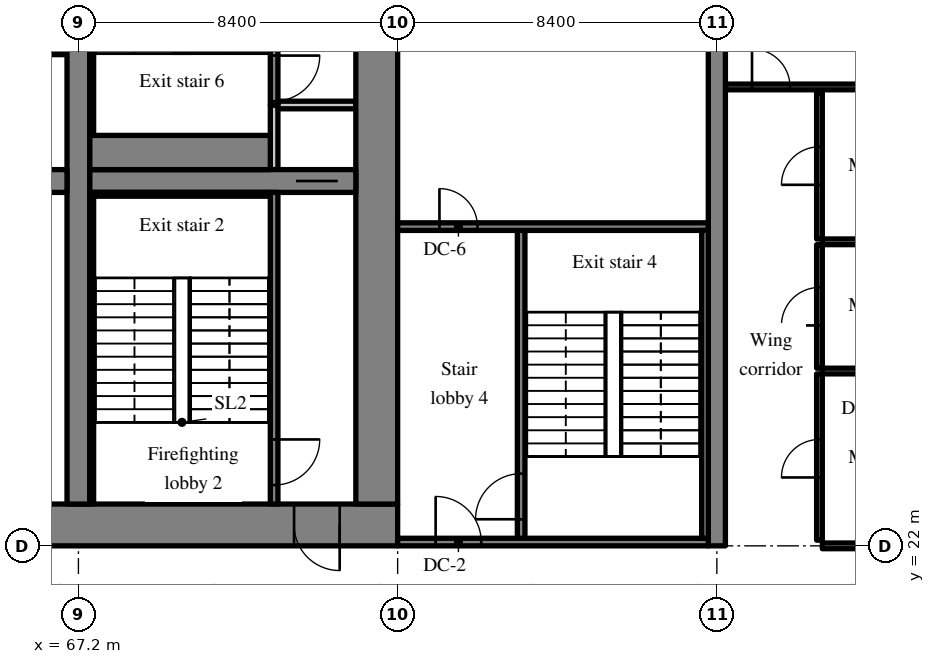
"""IFC4 building model, lengths in metres.
Left out: names, types, materials, properties, quantities, classifications, styles, units other than length and angle.
Written with IfcOpenShell. Run it as: python <this file> out.ifc"""

import sys

from ifc_helpers import new_model, si_unit, direction, frame, frame_2d, origin, place, context, subcontext, project, spatial, rectangle, extrude, source, transform, mapped, element, fill, save


model = new_model("IFC4")
c1 = context("Model", 3, precision=1e-05, world=origin(), true_north=direction((0.0, 1.0)))
c2 = subcontext(c1, "Body", "Model", "MODEL_VIEW")
j1 = project(units=[si_unit("LENGTHUNIT", "METRE"), si_unit("PLANEANGLEUNIT", "RADIAN")], contexts=[c1])
p1 = place(None, origin())
s1 = spatial("IfcSite", under=j1, at=p1, CompositionType="ELEMENT")
p2 = place(p1, origin())
s2 = spatial("IfcBuilding", under=s1, at=p2, CompositionType="ELEMENT")
p3 = place(p2, frame((0.0, 0.0, 35.4)))
s3 = spatial("IfcBuildingStorey", under=s2, at=p3, CompositionType="ELEMENT", Elevation=35.4)
m1 = source(origin(), c2, "Body", "SweptSolid", [
    extrude(rectangle(XDim=50.4, YDim=1.1, at=frame_2d((25.2, 0.0))), origin(), (0.0, 0.0, 1.0), 3.52),
])
p4 = place(p3, frame((25.2, 22.55, 0.0), z_axis=(0.0, 0.0, 1.0), x_axis=(1.0, 0.0, 0.0)))
e1 = element("IfcWall", 1, at=p4, inside=s3, PredefinedType="SHEAR", context=c2, shape_type="MappedRepresentation", body=[
    mapped(m1, transform((0.0, 0.0, 0.0), scale=1.0)),
])
m2 = source(origin(), c2, "Body", "SweptSolid", [
    extrude(rectangle(XDim=1.8, YDim=2.1, at=frame_2d((0.9, 1.05))), frame((0.0, 0.56, 0.0), z_axis=(0.0, -1.0, 0.0), x_axis=(1.0, 0.0, 0.0)), (0.0, 0.0, 1.0), 1.12),
])
p5 = place(p4, frame((15.9, 0.0, 0.0)))
e2 = element("IfcOpeningElement", 2, at=p5, cuts=e1, PredefinedType="OPENING", context=c2, shape_type="MappedRepresentation", body=[
    mapped(m2, transform((0.0, 0.0, 0.0), scale=1.0)),
])
m3 = source(origin(), c2, "Body", "SweptSolid", [
    extrude(rectangle(XDim=1.2, YDim=2.1, at=frame_2d((0.6, 1.05))), frame((0.0, 0.56, 0.0), z_axis=(0.0, -1.0, 0.0), x_axis=(1.0, 0.0, 0.0)), (0.0, 0.0, 1.0), 1.12),
])
p6 = place(p4, frame((27.0, 0.0, 0.0)))
e3 = element("IfcOpeningElement", 3, at=p6, cuts=e1, PredefinedType="OPENING", context=c2, shape_type="MappedRepresentation", body=[
    mapped(m3, transform((0.0, 0.0, 0.0), scale=1.0)),
])
m4 = source(origin(), c2, "Body", "SweptSolid", [
    extrude(rectangle(XDim=0.9, YDim=2.1, at=frame_2d((0.45, 1.05))), frame((0.0, 0.56, 0.0), z_axis=(0.0, -1.0, 0.0), x_axis=(1.0, 0.0, 0.0)), (0.0, 0.0, 1.0), 1.12),
])
p7 = place(p4, frame((33.75, 0.0, 0.0)))
e4 = element("IfcOpeningElement", 4, at=p7, cuts=e1, PredefinedType="OPENING", context=c2, shape_type="MappedRepresentation", body=[
    mapped(m4, transform((0.0, 0.0, 0.0), scale=1.0)),
])
p8 = place(p4, frame((30.75, 0.0, 0.0)))
e5 = element("IfcOpeningElement", 5, at=p8, cuts=e1, PredefinedType="OPENING", context=c2, shape_type="MappedRepresentation", body=[
    mapped(m4, transform((0.0, 0.0, 0.0), scale=1.0)),
])
p9 = place(p4, frame((39.75, 0.0, 0.0)))
e6 = element("IfcOpeningElement", 6, at=p9, cuts=e1, PredefinedType="OPENING", context=c2, shape_type="MappedRepresentation", body=[
    mapped(m4, transform((0.0, 0.0, 0.0), scale=1.0)),
])
p10 = place(p4, frame((36.75, 0.0, 0.0)))
e7 = element("IfcOpeningElement", 7, at=p10, cuts=e1, PredefinedType="OPENING", context=c2, shape_type="MappedRepresentation", body=[
    mapped(m4, transform((0.0, 0.0, 0.0), scale=1.0)),
])
p11 = place(p4, frame((6.425, 0.0, 0.0)))
e8 = element("IfcOpeningElement", 8, at=p11, cuts=e1, PredefinedType="OPENING", context=c2, shape_type="MappedRepresentation", body=[
    mapped(m3, transform((0.0, 0.0, 0.0), scale=1.0)),
])
p12 = place(p4, frame((47.675, 0.0, 0.0)))
e9 = element("IfcOpeningElement", 9, at=p12, cuts=e1, PredefinedType="OPENING", context=c2, shape_type="MappedRepresentation", body=[
    mapped(m3, transform((0.0, 0.0, 0.0), scale=1.0)),
])
m5 = source(origin(), c2, "Body", "SweptSolid", [
    extrude(rectangle(XDim=17.8, YDim=1.1, at=frame_2d((8.9, 0.0))), origin(), (0.0, 0.0, 1.0), 3.52),
])
p13 = place(p3, frame((75.05, 23.1, 0.0), z_axis=(0.0, 0.0, 1.0), x_axis=(0.0, 1.0, 0.0)))
e10 = element("IfcWall", 10, at=p13, inside=s3, PredefinedType="SHEAR", context=c2, shape_type="MappedRepresentation", body=[
    mapped(m5, transform((0.0, 0.0, 0.0), scale=1.0)),
])
p14 = place(p13, frame((12.3, 0.0, 0.0)))
e11 = element("IfcOpeningElement", 11, at=p14, cuts=e10, PredefinedType="OPENING", context=c2, shape_type="MappedRepresentation", body=[
    mapped(m3, transform((0.0, 0.0, 0.0), scale=1.0)),
])
m6 = source(origin(), c2, "Body", "SweptSolid", [
    extrude(rectangle(XDim=17.8, YDim=0.6, at=frame_2d((8.9, 0.0))), origin(), (0.0, 0.0, 1.0), 3.52),
])
p15 = place(p3, frame((67.2, 23.1, 0.0), z_axis=(0.0, 0.0, 1.0), x_axis=(0.0, 1.0, 0.0)))
e12 = element("IfcWall", 12, at=p15, inside=s3, PredefinedType="SHEAR", context=c2, shape_type="MappedRepresentation", body=[
    mapped(m6, transform((0.0, 0.0, 0.0), scale=1.0)),
])
m7 = source(origin(), c2, "Body", "SweptSolid", [
    extrude(rectangle(XDim=16.2, YDim=0.6, at=frame_2d((8.1, 0.0))), origin(), (0.0, 0.0, 1.0), 3.52),
])
p16 = place(p3, frame((50.7, 31.6, 0.0), z_axis=(0.0, 0.0, 1.0), x_axis=(1.0, 0.0, 0.0)))
e13 = element("IfcWall", 13, at=p16, inside=s3, PredefinedType="SHEAR", context=c2, shape_type="MappedRepresentation", body=[
    mapped(m7, transform((0.0, 0.0, 0.0), scale=1.0)),
])
m8 = source(origin(), c2, "Body", "SweptSolid", [
    extrude(rectangle(XDim=1.0, YDim=2.1, at=frame_2d((0.5, 1.05))), frame((0.0, 0.31, 0.0), z_axis=(0.0, -1.0, 0.0), x_axis=(1.0, 0.0, 0.0)), (0.0, 0.0, 1.0), 0.62),
])
p17 = place(p16, frame((0.55, 0.0, 0.0)))
e14 = element("IfcOpeningElement", 14, at=p17, cuts=e13, PredefinedType="OPENING", context=c2, shape_type="MappedRepresentation", body=[
    mapped(m8, transform((0.0, 0.0, 0.0), scale=1.0)),
])
m9 = source(origin(), c2, "Body", "SweptSolid", [
    extrude(rectangle(XDim=7.0, YDim=0.6, at=frame_2d((3.5, 0.0))), origin(), (0.0, 0.0, 1.0), 3.52),
])
p18 = place(p3, frame((67.5, 31.6, 0.0), z_axis=(0.0, 0.0, 1.0), x_axis=(1.0, 0.0, 0.0)))
e15 = element("IfcWall", 15, at=p18, inside=s3, PredefinedType="SHEAR", context=c2, shape_type="MappedRepresentation", body=[
    mapped(m9, transform((0.0, 0.0, 0.0), scale=1.0)),
])
m10 = source(origin(), c2, "Body", "SweptSolid", [
    extrude(rectangle(XDim=1.1, YDim=2.1, at=frame_2d((0.55, 1.05))), frame((0.0, 0.31, 0.0), z_axis=(0.0, -1.0, 0.0), x_axis=(1.0, 0.0, 0.0)), (0.0, 0.0, 1.0), 0.62),
])
p19 = place(p18, frame((5.425, 0.0, 0.0)))
e16 = element("IfcOpeningElement", 16, at=p19, cuts=e15, PredefinedType="OPENING", context=c2, shape_type="MappedRepresentation", body=[
    mapped(m10, transform((0.0, 0.0, 0.0), scale=1.0)),
])
m11 = source(origin(), c2, "Body", "SweptSolid", [
    extrude(rectangle(XDim=20.0, YDim=0.45, at=frame_2d((10.0, 0.0))), origin(), (0.0, 0.0, 1.0), 3.52),
])
p20 = place(p3, frame((84.0, 22.0, 0.0), z_axis=(0.0, 0.0, 1.0), x_axis=(0.0, 1.0, 0.0)))
e17 = element("IfcWall", 17, at=p20, inside=s3, PredefinedType="SHEAR", context=c2, shape_type="MappedRepresentation", body=[
    mapped(m11, transform((0.0, 0.0, 0.0), scale=1.0)),
])
m12 = source(origin(), c2, "Body", "SweptSolid", [
    extrude(rectangle(XDim=14.1, YDim=0.15, at=frame_2d((7.05, 0.0))), origin(), (0.0, 0.0, 1.0), 3.52),
])
p21 = place(p3, frame((66.9, 35.0, 0.0), z_axis=(0.0, 0.0, 1.0), x_axis=(-1.0, 0.0, 0.0)))
e18 = element("IfcWall", 18, at=p21, inside=s3, PredefinedType="PARTITIONING", context=c2, shape_type="MappedRepresentation", body=[
    mapped(m12, transform((0.0, 0.0, 0.0), scale=1.0)),
])
m13 = source(origin(), c2, "Body", "SweptSolid", [
    extrude(rectangle(XDim=0.9, YDim=2.1, at=frame_2d((0.45, 1.05))), frame((0.0, 0.085, 0.0), z_axis=(0.0, -1.0, 0.0), x_axis=(1.0, 0.0, 0.0)), (0.0, 0.0, 1.0), 0.17),
])
p22 = place(p21, frame((2.004, 0.0, 0.0)))
e19 = element("IfcOpeningElement", 19, at=p22, cuts=e18, PredefinedType="OPENING", context=c2, shape_type="MappedRepresentation", body=[
    mapped(m13, transform((0.0, 0.0, 0.0), scale=1.0)),
])
p23 = place(p21, frame((9.017, 0.0, 0.0)))
e20 = element("IfcOpeningElement", 20, at=p23, cuts=e18, PredefinedType="OPENING", context=c2, shape_type="MappedRepresentation", body=[
    mapped(m13, transform((0.0, 0.0, 0.0), scale=1.0)),
])
m14 = source(origin(), c2, "Body", "SweptSolid", [
    extrude(rectangle(XDim=8.2, YDim=0.2, at=frame_2d((4.1, 0.0))), origin(), (0.0, 0.0, 1.0), 3.52),
])
p24 = place(p3, frame((72.35, 23.1, 0.0), z_axis=(0.0, 0.0, 1.0), x_axis=(0.0, 1.0, 0.0)))
e21 = element("IfcWall", 21, at=p24, inside=s3, PredefinedType="SOLIDWALL", context=c2, shape_type="MappedRepresentation", body=[
    mapped(m14, transform((0.0, 0.0, 0.0), scale=1.0)),
])
m15 = source(origin(), c2, "Body", "SweptSolid", [
    extrude(rectangle(XDim=1.2, YDim=2.1, at=frame_2d((0.6, 1.05))), frame((0.0, 0.11, 0.0), z_axis=(0.0, -1.0, 0.0), x_axis=(1.0, 0.0, 0.0)), (0.0, 0.0, 1.0), 0.22),
])
p25 = place(p24, frame((0.5, 0.0, 0.0)))
e22 = element("IfcOpeningElement", 22, at=p25, cuts=e21, PredefinedType="OPENING", context=c2, shape_type="MappedRepresentation", body=[
    mapped(m15, transform((0.0, 0.0, 0.0), scale=1.0)),
])
m16 = source(origin(), c2, "Body", "SweptSolid", [
    extrude(rectangle(XDim=1.7, YDim=0.2, at=frame_2d((0.85, 0.0))), origin(), (0.0, 0.0, 1.0), 3.52),
])
p26 = place(p3, frame((72.35, 31.9, 0.0), z_axis=(0.0, 0.0, 1.0), x_axis=(0.0, 1.0, 0.0)))
e23 = element("IfcWall", 23, at=p26, inside=s3, PredefinedType="SOLIDWALL", context=c2, shape_type="MappedRepresentation", body=[
    mapped(m16, transform((0.0, 0.0, 0.0), scale=1.0)),
])
m17 = source(origin(), c2, "Body", "SweptSolid", [
    extrude(rectangle(XDim=2.05, YDim=0.2, at=frame_2d((1.025, 0.0))), origin(), (0.0, 0.0, 1.0), 3.52),
])
p27 = place(p3, frame((72.45, 33.6, 0.0), z_axis=(0.0, 0.0, 1.0), x_axis=(1.0, 0.0, 0.0)))
e24 = element("IfcWall", 24, at=p27, inside=s3, PredefinedType="SOLIDWALL", context=c2, shape_type="MappedRepresentation", body=[
    mapped(m17, transform((0.0, 0.0, 0.0), scale=1.0)),
])
m18 = source(origin(), c2, "Body", "SweptSolid", [
    extrude(rectangle(XDim=7.3, YDim=0.2, at=frame_2d((3.65, 0.0))), origin(), (0.0, 0.0, 1.0), 3.52),
])
p28 = place(p3, frame((72.35, 33.6, 0.0), z_axis=(0.0, 0.0, 1.0), x_axis=(0.0, 1.0, 0.0)))
e25 = element("IfcWall", 25, at=p28, inside=s3, PredefinedType="SOLIDWALL", context=c2, shape_type="MappedRepresentation", body=[
    mapped(m18, transform((0.0, 0.0, 0.0), scale=1.0)),
])
p29 = place(p28, frame((0.1, 0.0, 0.0)))
e26 = element("IfcOpeningElement", 26, at=p29, cuts=e25, PredefinedType="OPENING", context=c2, shape_type="MappedRepresentation", body=[
    mapped(m15, transform((0.0, 0.0, 0.0), scale=1.0)),
])
m19 = source(origin(), c2, "Body", "SweptSolid", [
    extrude(rectangle(XDim=8.3, YDim=0.2, at=frame_2d((4.15, 0.0))), origin(), (0.0, 0.0, 1.0), 3.52),
])
p30 = place(p3, frame((78.85, 22.1, 0.0), z_axis=(0.0, 0.0, 1.0), x_axis=(0.0, 1.0, 0.0)))
e27 = element("IfcWall", 27, at=p30, inside=s3, PredefinedType="SOLIDWALL", context=c2, shape_type="MappedRepresentation", body=[
    mapped(m19, transform((0.0, 0.0, 0.0), scale=1.0)),
])
p31 = place(p30, frame((0.6, 0.0, 0.0)))
e28 = element("IfcOpeningElement", 28, at=p31, cuts=e27, PredefinedType="OPENING", context=c2, shape_type="MappedRepresentation", body=[
    mapped(m15, transform((0.0, 0.0, 0.0), scale=1.0)),
])
m20 = source(origin(), c2, "Body", "SweptSolid", [
    extrude(rectangle(XDim=8.175, YDim=0.2, at=frame_2d((4.087, 0.0))), origin(), (0.0, 0.0, 1.0), 3.52),
])
p32 = place(p3, frame((83.775, 22.1, 0.0), z_axis=(0.0, 0.0, 1.0), x_axis=(-1.0, 0.0, 0.0)))
e29 = element("IfcWall", 29, at=p32, inside=s3, PredefinedType="SOLIDWALL", context=c2, shape_type="MappedRepresentation", body=[
    mapped(m20, transform((0.0, 0.0, 0.0), scale=1.0)),
])
p33 = place(p32, frame((5.975, 0.0, 0.0)))
e30 = element("IfcOpeningElement", 30, at=p33, cuts=e29, PredefinedType="OPENING", context=c2, shape_type="MappedRepresentation", body=[
    mapped(m15, transform((0.0, 0.0, 0.0), scale=1.0)),
])
p34 = place(p3, frame((83.775, 30.4, 0.0), z_axis=(0.0, 0.0, 1.0), x_axis=(-1.0, 0.0, 0.0)))
e31 = element("IfcWall", 31, at=p34, inside=s3, PredefinedType="SOLIDWALL", context=c2, shape_type="MappedRepresentation", body=[
    mapped(m20, transform((0.0, 0.0, 0.0), scale=1.0)),
])
m21 = source(origin(), c2, "Body", "SweptSolid", [
    extrude(rectangle(XDim=1.0, YDim=2.1, at=frame_2d((0.5, 1.05))), frame((0.0, 0.11, 0.0), z_axis=(0.0, -1.0, 0.0), x_axis=(1.0, 0.0, 0.0)), (0.0, 0.0, 1.0), 0.22),
])
p35 = place(p34, frame((6.075, 0.0, 0.0)))
e32 = element("IfcOpeningElement", 32, at=p35, cuts=e31, PredefinedType="OPENING", context=c2, shape_type="MappedRepresentation", body=[
    mapped(m21, transform((0.0, 0.0, 0.0), scale=1.0)),
])
m22 = source(origin(), c2, "Body", "SweptSolid", [
    extrude(rectangle(XDim=4.75, YDim=0.1, at=frame_2d((2.375, 0.0))), origin(), (0.0, 0.0, 1.0), 3.52),
])
p36 = place(p3, frame((67.5, 31.25, 0.0), z_axis=(0.0, 0.0, 1.0), x_axis=(1.0, 0.0, 0.0)))
e33 = element("IfcWall", 33, at=p36, inside=s3, PredefinedType="SOLIDWALL", context=c2, shape_type="MappedRepresentation", body=[
    mapped(m22, transform((0.0, 0.0, 0.0), scale=1.0)),
])
m23 = source(origin(), c2, "Body", "SweptSolid", [
    extrude(rectangle(XDim=8.1, YDim=0.1, at=frame_2d((4.05, 0.0))), origin(), (0.0, 0.0, 1.0), 3.52),
])
p37 = place(p3, frame((67.55, 23.1, 0.0), z_axis=(0.0, 0.0, 1.0), x_axis=(0.0, 1.0, 0.0)))
e34 = element("IfcWall", 34, at=p37, inside=s3, PredefinedType="SOLIDWALL", context=c2, shape_type="MappedRepresentation", body=[
    mapped(m23, transform((0.0, 0.0, 0.0), scale=1.0)),
])
m24 = source(origin(), c2, "Body", "SweptSolid", [
    extrude(rectangle(XDim=4.75, YDim=0.9, at=frame_2d((2.375, 0.0))), origin(), (0.0, 0.0, 1.0), 3.52),
])
p38 = place(p3, frame((67.5, 32.35, 0.0), z_axis=(0.0, 0.0, 1.0), x_axis=(1.0, 0.0, 0.0)))
e35 = element("IfcWall", 35, at=p38, inside=s3, PredefinedType="SOLIDWALL", context=c2, shape_type="MappedRepresentation", body=[
    mapped(m24, transform((0.0, 0.0, 0.0), scale=1.0)),
])
p39 = place(p3, frame((67.55, 32.8, 0.0), z_axis=(0.0, 0.0, 1.0), x_axis=(0.0, 1.0, 0.0)))
e36 = element("IfcWall", 36, at=p39, inside=s3, PredefinedType="SOLIDWALL", context=c2, shape_type="MappedRepresentation", body=[
    mapped(m23, transform((0.0, 0.0, 0.0), scale=1.0)),
])
m25 = source(origin(), c2, "Body", "SweptSolid", [
    extrude(rectangle(XDim=8.1, YDim=0.175, at=frame_2d((4.05, 0.0))), origin(), (0.0, 0.0, 1.0), 3.52),
])
p40 = place(p3, frame((83.688, 22.2, 0.0), z_axis=(0.0, 0.0, 1.0), x_axis=(0.0, 1.0, 0.0)))
e37 = element("IfcWall", 37, at=p40, inside=s3, PredefinedType="SOLIDWALL", context=c2, shape_type="MappedRepresentation", body=[
    mapped(m25, transform((0.0, 0.0, 0.0), scale=1.0)),
])
m26 = source(origin(), c2, "Body", "SweptSolid", [
    extrude(rectangle(XDim=5.4, YDim=0.15, at=frame_2d((2.7, 0.0))), origin(), (0.0, 0.0, 1.0), 2.82),
])
p41 = place(p3, frame((86.775, 22.0, 0.0), z_axis=(0.0, 0.0, 1.0), x_axis=(1.0, 0.0, 0.0)))
e38 = element("IfcWall", 38, at=p41, inside=s3, PredefinedType="PARTITIONING", context=c2, shape_type="MappedRepresentation", body=[
    mapped(m26, transform((0.0, 0.0, 0.0), scale=1.0)),
])
m27 = source(origin(), c2, "Body", "SweptSolid", [
    extrude(rectangle(XDim=4.375, YDim=0.15, at=frame_2d((2.188, 0.0))), origin(), (0.0, 0.0, 1.0), 3.52),
])
p42 = place(p3, frame((86.7, 22.15, 0.0), z_axis=(0.0, 0.0, 1.0), x_axis=(0.0, 1.0, 0.0)))
e39 = element("IfcWall", 39, at=p42, inside=s3, PredefinedType="PARTITIONING", context=c2, shape_type="MappedRepresentation", body=[
    mapped(m27, transform((0.0, 0.0, 0.0), scale=1.0)),
])
m28 = source(origin(), c2, "Body", "SweptSolid", [
    extrude(rectangle(XDim=1.0, YDim=2.1, at=frame_2d((0.5, 1.05))), frame((0.0, 0.085, 0.0), z_axis=(0.0, -1.0, 0.0), x_axis=(1.0, 0.0, 0.0)), (0.0, 0.0, 1.0), 0.17),
])
p43 = place(p42, frame((1.65, 0.0, 0.0)))
e40 = element("IfcOpeningElement", 40, at=p43, cuts=e39, PredefinedType="OPENING", context=c2, shape_type="MappedRepresentation", body=[
    mapped(m28, transform((0.0, 0.0, 0.0), scale=1.0)),
])
m29 = source(origin(), c2, "Body", "SweptSolid", [
    extrude(rectangle(XDim=5.4, YDim=0.15, at=frame_2d((2.7, 0.0))), origin(), (0.0, 0.0, 1.0), 3.52),
])
p44 = place(p3, frame((86.775, 26.6, 0.0), z_axis=(0.0, 0.0, 1.0), x_axis=(1.0, 0.0, 0.0)))
e41 = element("IfcWall", 41, at=p44, inside=s3, PredefinedType="PARTITIONING", context=c2, shape_type="MappedRepresentation", body=[
    mapped(m29, transform((0.0, 0.0, 0.0), scale=1.0)),
])
m30 = source(origin(), c2, "Body", "SweptSolid", [
    extrude(rectangle(XDim=3.25, YDim=0.15, at=frame_2d((1.625, 0.0))), origin(), (0.0, 0.0, 1.0), 3.52),
])
p45 = place(p3, frame((86.7, 26.675, 0.0), z_axis=(0.0, 0.0, 1.0), x_axis=(0.0, 1.0, 0.0)))
e42 = element("IfcWall", 42, at=p45, inside=s3, PredefinedType="PARTITIONING", context=c2, shape_type="MappedRepresentation", body=[
    mapped(m30, transform((0.0, 0.0, 0.0), scale=1.0)),
])
p46 = place(p45, frame((1.125, 0.0, 0.0)))
e43 = element("IfcOpeningElement", 43, at=p46, cuts=e42, PredefinedType="OPENING", context=c2, shape_type="MappedRepresentation", body=[
    mapped(m28, transform((0.0, 0.0, 0.0), scale=1.0)),
])
p47 = place(p3, frame((86.775, 30.0, 0.0), z_axis=(0.0, 0.0, 1.0), x_axis=(1.0, 0.0, 0.0)))
e44 = element("IfcWall", 44, at=p47, inside=s3, PredefinedType="PARTITIONING", context=c2, shape_type="MappedRepresentation", body=[
    mapped(m29, transform((0.0, 0.0, 0.0), scale=1.0)),
])
m31 = source(origin(), c2, "Body", "SweptSolid", [
    extrude(rectangle(XDim=3.85, YDim=0.15, at=frame_2d((1.925, 0.0))), origin(), (0.0, 0.0, 1.0), 3.52),
])
p48 = place(p3, frame((86.7, 30.075, 0.0), z_axis=(0.0, 0.0, 1.0), x_axis=(0.0, 1.0, 0.0)))
e45 = element("IfcWall", 45, at=p48, inside=s3, PredefinedType="PARTITIONING", context=c2, shape_type="MappedRepresentation", body=[
    mapped(m31, transform((0.0, 0.0, 0.0), scale=1.0)),
])
p49 = place(p48, frame((1.425, 0.0, 0.0)))
e46 = element("IfcOpeningElement", 46, at=p49, cuts=e45, PredefinedType="OPENING", context=c2, shape_type="MappedRepresentation", body=[
    mapped(m28, transform((0.0, 0.0, 0.0), scale=1.0)),
])
m32 = source(origin(), c2, "Body", "SweptSolid", [
    extrude(rectangle(XDim=7.95, YDim=0.15, at=frame_2d((3.975, 0.0))), origin(), (0.0, 0.0, 1.0), 3.52),
])
p50 = place(p3, frame((84.225, 34.075, 0.0), z_axis=(0.0, 0.0, 1.0), x_axis=(1.0, 0.0, 0.0)))
e47 = element("IfcWall", 47, at=p50, inside=s3, PredefinedType="PARTITIONING", context=c2, shape_type="MappedRepresentation", body=[
    mapped(m32, transform((0.0, 0.0, 0.0), scale=1.0)),
])
p51 = place(p50, frame((0.7, 0.0, 0.0)))
e48 = element("IfcOpeningElement", 48, at=p51, cuts=e47, PredefinedType="OPENING", context=c2, shape_type="MappedRepresentation", body=[
    mapped(m28, transform((0.0, 0.0, 0.0), scale=1.0)),
])
m33 = source(origin(), c2, "Body", "SweptSolid", [
    extrude(rectangle(XDim=1.2, YDim=2.1, at=frame_2d((0.6, 1.05))), frame((0.0, 0.025, 0.0), z_axis=(0.0, -1.0, 0.0), x_axis=(1.0, 0.0, 0.0)), (0.0, 0.0, 1.0), 0.05),
])
p52 = place(p25, origin())
e49 = element("IfcDoor", 49, at=p52, inside=s3, OperationType="SINGLE_SWING_RIGHT", PredefinedType="DOOR", context=c2, shape_type="MappedRepresentation", body=[
    mapped(m33, transform((0.0, 0.0, 0.0), scale=1.0)),
])
fill(e22, e49)
m34 = source(origin(), c2, "Body", "SweptSolid", [
    extrude(rectangle(XDim=1.2, YDim=2.1, at=frame_2d((0.6, 1.05))), frame((0.0, 0.325, 0.0), z_axis=(0.0, -1.0, 0.0), x_axis=(1.0, 0.0, 0.0)), (0.0, 0.0, 1.0), 0.05),
])
p53 = place(p12, origin())
e50 = element("IfcDoor", 50, at=p53, inside=s3, OperationType="SINGLE_SWING_RIGHT", PredefinedType="DOOR", context=c2, shape_type="MappedRepresentation", body=[
    mapped(m34, transform((0.0, 0.0, 0.0), scale=1.0)),
])
fill(e9, e50)
m35 = source(origin(), c2, "Body", "SweptSolid", [
    extrude(rectangle(XDim=1.1, YDim=2.1, at=frame_2d((0.55, 1.05))), frame((0.0, 0.025, 0.0), z_axis=(0.0, -1.0, 0.0), x_axis=(1.0, 0.0, 0.0)), (0.0, 0.0, 1.0), 0.05),
])
p54 = place(p19, origin())
e51 = element("IfcDoor", 51, at=p54, inside=s3, OperationType="SLIDING_TO_RIGHT", PredefinedType="DOOR", context=c2, shape_type="MappedRepresentation", body=[
    mapped(m35, transform((0.0, 0.0, 0.0), scale=1.0)),
])
fill(e16, e51)
p55 = place(p29, origin())
e52 = element("IfcDoor", 52, at=p55, inside=s3, OperationType="SINGLE_SWING_RIGHT", PredefinedType="DOOR", context=c2, shape_type="MappedRepresentation", body=[
    mapped(m33, transform((0.0, 0.0, 0.0), scale=1.0)),
])
fill(e26, e52)
p56 = place(p31, origin())
e53 = element("IfcDoor", 53, at=p56, inside=s3, OperationType="SINGLE_SWING_LEFT", PredefinedType="DOOR", context=c2, shape_type="MappedRepresentation", body=[
    mapped(m33, transform((0.0, 0.0, 0.0), scale=1.0)),
])
fill(e28, e53)
p57 = place(p33, origin())
e54 = element("IfcDoor", 54, at=p57, inside=s3, OperationType="SINGLE_SWING_RIGHT", PredefinedType="DOOR", context=c2, shape_type="MappedRepresentation", body=[
    mapped(m33, transform((0.0, 0.0, 0.0), scale=1.0)),
])
fill(e30, e54)
m36 = source(origin(), c2, "Body", "SweptSolid", [
    extrude(rectangle(XDim=1.0, YDim=2.1, at=frame_2d((0.5, 1.05))), frame((0.0, 0.025, 0.0), z_axis=(0.0, -1.0, 0.0), x_axis=(1.0, 0.0, 0.0)), (0.0, 0.0, 1.0), 0.05),
])
p58 = place(p35, origin())
e55 = element("IfcDoor", 55, at=p58, inside=s3, OperationType="SINGLE_SWING_RIGHT", PredefinedType="DOOR", context=c2, shape_type="MappedRepresentation", body=[
    mapped(m36, transform((0.0, 0.0, 0.0), scale=1.0)),
])
fill(e32, e55)
p59 = place(p43, origin())
e56 = element("IfcDoor", 56, at=p59, inside=s3, OperationType="SINGLE_SWING_LEFT", PredefinedType="DOOR", context=c2, shape_type="MappedRepresentation", body=[
    mapped(m36, transform((0.0, 0.0, 0.0), scale=1.0)),
])
fill(e40, e56)
p60 = place(p46, origin())
e57 = element("IfcDoor", 57, at=p60, inside=s3, OperationType="SINGLE_SWING_LEFT", PredefinedType="DOOR", context=c2, shape_type="MappedRepresentation", body=[
    mapped(m36, transform((0.0, 0.0, 0.0), scale=1.0)),
])
fill(e43, e57)
p61 = place(p49, origin())
e58 = element("IfcDoor", 58, at=p61, inside=s3, OperationType="SINGLE_SWING_LEFT", PredefinedType="DOOR", context=c2, shape_type="MappedRepresentation", body=[
    mapped(m36, transform((0.0, 0.0, 0.0), scale=1.0)),
])
fill(e46, e58)
p62 = place(p51, origin())
e59 = element("IfcDoor", 59, at=p62, inside=s3, OperationType="SINGLE_SWING_LEFT", PredefinedType="DOOR", context=c2, shape_type="MappedRepresentation", body=[
    mapped(m36, transform((0.0, 0.0, 0.0), scale=1.0)),
])
fill(e48, e59)
save(model, sys.argv[1])
